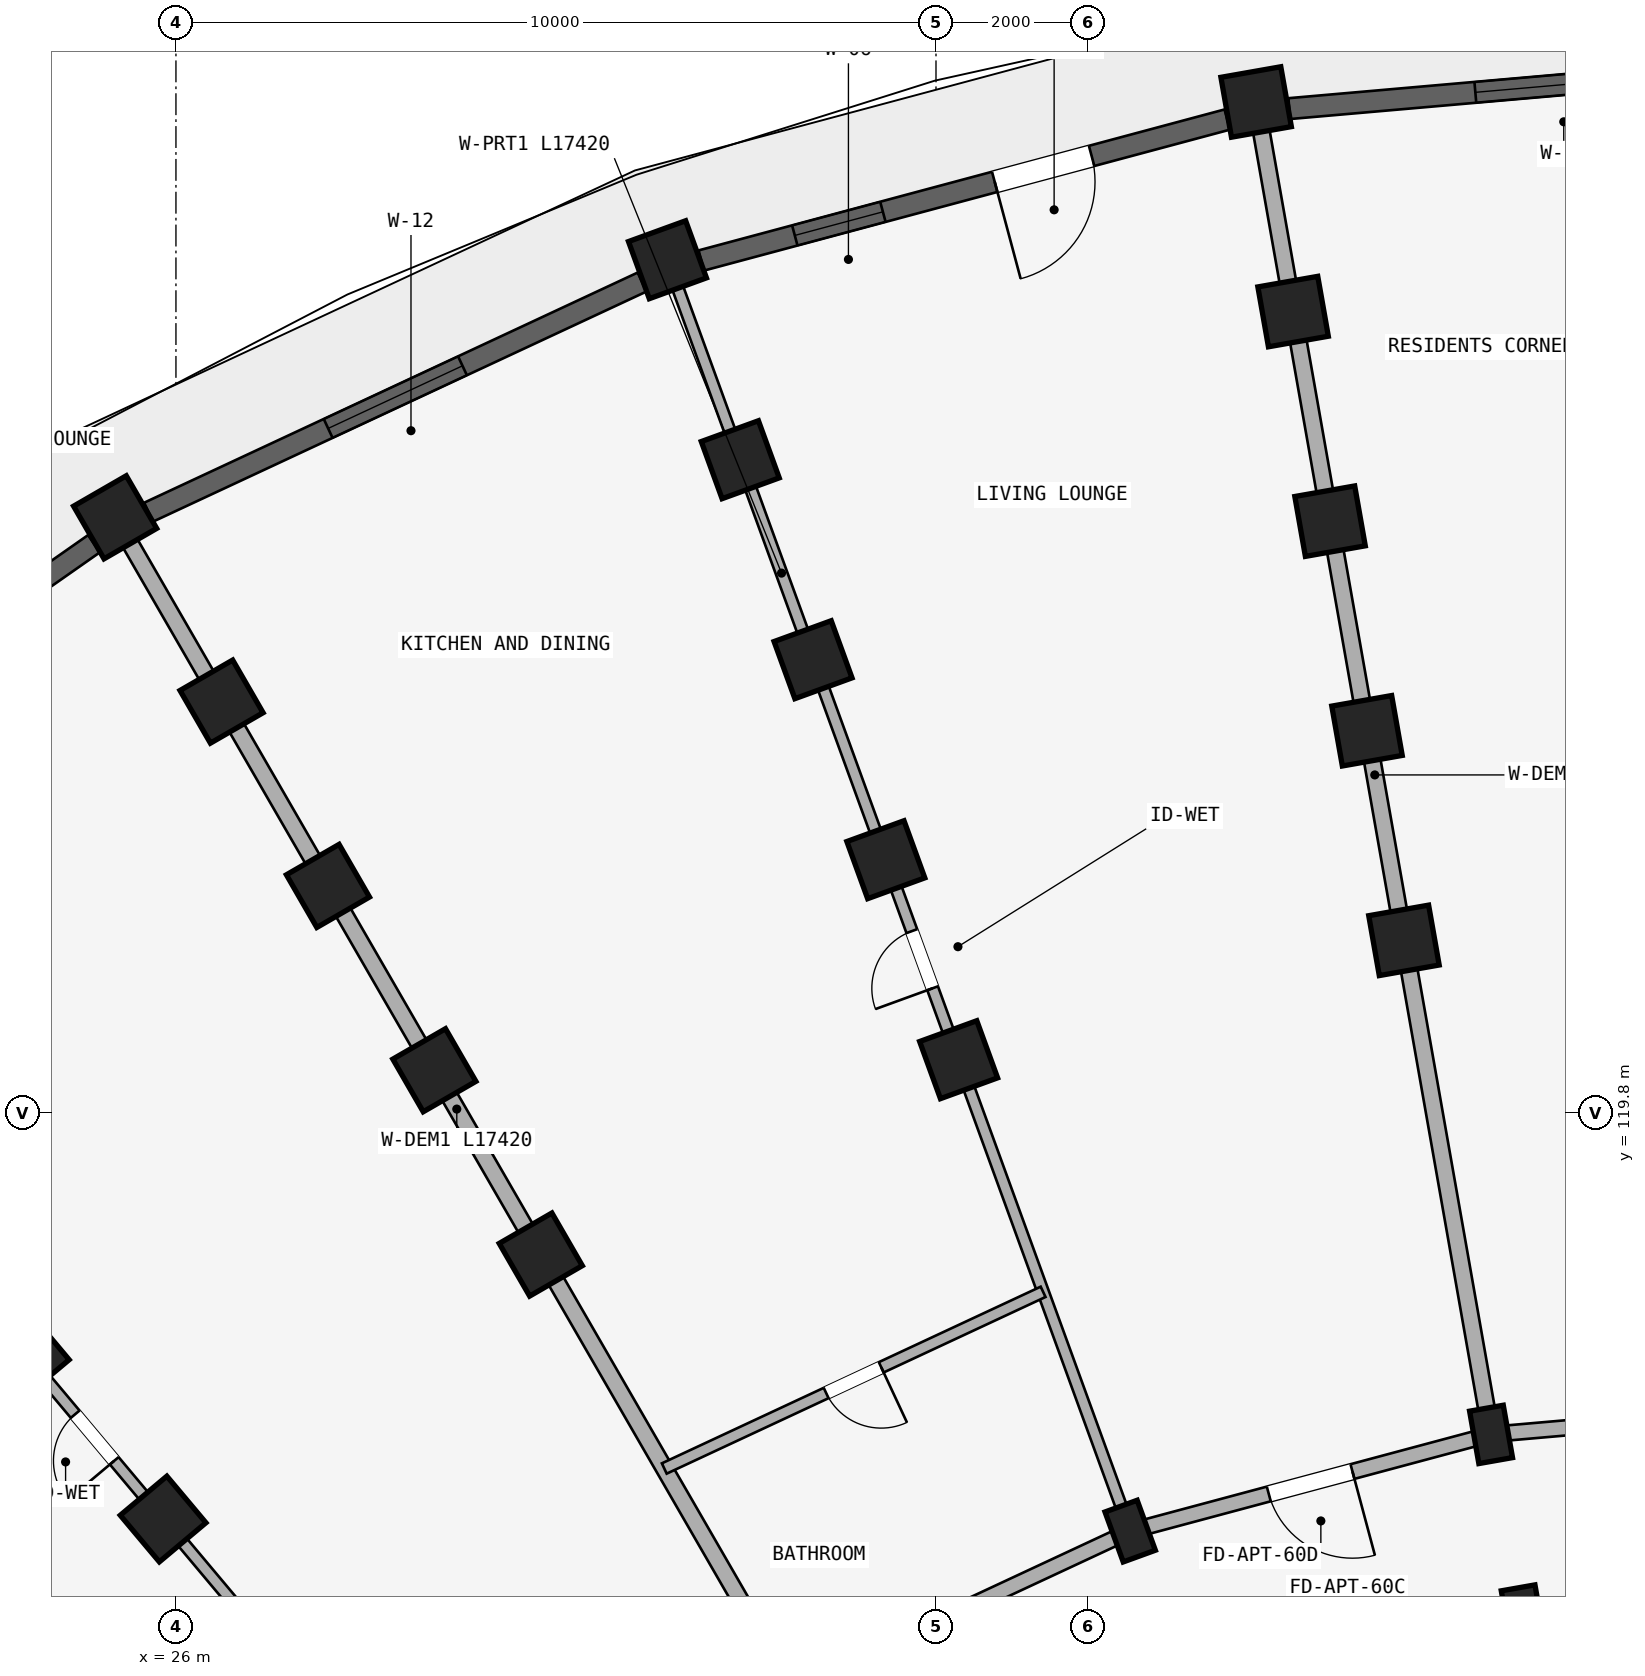
"""IFC4 building model, lengths in metres.
Left out: names, types, materials, properties, quantities, classifications, styles, units other than length and angle.
Written with IfcOpenShell. Run it as: python <this file> out.ifc"""

import sys

from ifc_helpers import new_model, si_unit, direction, frame, frame_2d, origin, origin_2d, place, context, subcontext, project, spatial, rectangle, extrude, element, fill, save


model = new_model("IFC4")
c1 = context("Model", 3, precision=1e-05, world=origin(), true_north=direction((0.0, 1.0)))
c2 = subcontext(c1, "Body", "Model", "MODEL_VIEW")
j1 = project(units=[si_unit("LENGTHUNIT", "METRE"), si_unit("PLANEANGLEUNIT", "RADIAN")], contexts=[c1])
p1 = place(None, origin())
s1 = spatial("IfcSite", under=j1, at=p1, CompositionType="ELEMENT")
p2 = place(p1, origin())
s2 = spatial("IfcBuilding", under=s1, at=p2, CompositionType="ELEMENT")
p3 = place(p2, frame((0.0, 0.0, 15.0)))
s3 = spatial("IfcBuildingStorey", under=s2, at=p3, CompositionType="ELEMENT", Elevation=15.0)
for number, where, z_axis, x_axis in (
    (1, (43.72, 113.208, 0.0), (0.0, 0.0, 1.0), (0.985, 0.174, 0.0)),
    (2, (43.303, 115.572, 0.0), (0.0, 0.0, 1.0), (0.985, 0.174, 0.0)),
):
    element("IfcColumn", number, at=place(p3, frame(where, z_axis=z_axis, x_axis=x_axis)), inside=s3, PredefinedType="COLUMN", context=c2, shape_type="SweptSolid", body=[
        extrude(rectangle(XDim=0.45, YDim=0.7, at=origin_2d()), origin(), (0.0, 0.0, 1.0), 2.93),
    ])
for number, where, z_axis, x_axis in (
    (3, (42.157, 122.071, 0.0), (0.0, 0.0, 1.0), (0.985, 0.174, 0.0)),
    (4, (41.671, 124.829, 0.0), (0.0, 0.0, 1.0), (0.985, 0.174, 0.0)),
    (5, (41.185, 127.586, 0.0), (0.0, 0.0, 1.0), (0.985, 0.174, 0.0)),
    (6, (40.698, 130.344, 0.0), (0.0, 0.0, 1.0), (0.985, 0.174, 0.0)),
    (7, (40.212, 133.101, 0.0), (0.0, 0.0, 1.0), (0.985, 0.174, 0.0)),
):
    element("IfcColumn", number, at=place(p3, frame(where, z_axis=z_axis, x_axis=x_axis)), inside=s3, PredefinedType="COLUMN", context=c2, shape_type="SweptSolid", body=[
        extrude(rectangle(XDim=0.8, YDim=0.8, at=origin_2d()), origin(), (0.0, 0.0, 1.0), 2.93),
    ])
p4 = place(p3, frame((38.555, 114.299, 0.0), z_axis=(0.0, 0.0, 1.0), x_axis=(0.939692620786, 0.342020143326, 0.0)))
e8 = element("IfcColumn", 8, at=p4, inside=s3, PredefinedType="COLUMN", context=c2, shape_type="SweptSolid", body=[
    extrude(rectangle(XDim=0.45, YDim=0.7, at=origin_2d()), origin(), (0.0, 0.0, 1.0), 2.93),
])
for number, where, z_axis, x_axis in (
    (9, (36.298, 120.501, 0.0), (0.0, 0.0, 1.0), (0.94, 0.342, 0.0)),
    (10, (35.34, 123.132, 0.0), (0.0, 0.0, 1.0), (0.94, 0.342, 0.0)),
    (11, (34.382, 125.764, 0.0), (0.0, 0.0, 1.0), (0.94, 0.342, 0.0)),
    (12, (33.425, 128.395, 0.0), (0.0, 0.0, 1.0), (0.94, 0.342, 0.0)),
    (13, (32.467, 131.026, 0.0), (0.0, 0.0, 1.0), (0.94, 0.342, 0.0)),
    (14, (30.8, 117.938, 0.0), (0.0, 0.0, 1.0), (0.866, 0.5, 0.0)),
    (15, (29.4, 120.363, 0.0), (0.0, 0.0, 1.0), (0.866, 0.5, 0.0)),
    (16, (28.0, 122.787, 0.0), (0.0, 0.0, 1.0), (0.866, 0.5, 0.0)),
    (17, (26.6, 125.212, 0.0), (0.0, 0.0, 1.0), (0.866, 0.5, 0.0)),
    (18, (25.2, 127.637, 0.0), (0.0, 0.0, 1.0), (0.866, 0.5, 0.0)),
    (19, (25.831, 114.458, 0.0), (0.0, 0.0, 1.0), (0.766, 0.643, 0.0)),
    (20, (24.031, 116.603, 0.0), (0.0, 0.0, 1.0), (0.766, 0.643, 0.0)),
):
    element("IfcColumn", number, at=place(p3, frame(where, z_axis=z_axis, x_axis=x_axis)), inside=s3, PredefinedType="COLUMN", context=c2, shape_type="SweptSolid", body=[
        extrude(rectangle(XDim=0.8, YDim=0.8, at=origin_2d()), origin(), (0.0, 0.0, 1.0), 2.93),
    ])
p5 = place(p3, frame((48.2, 113.6, 0.0), z_axis=(0.0, 0.0, 1.0), x_axis=(-0.996191949488, -0.087187153726, 0.0)))
e21 = element("IfcWall", 21, at=p5, inside=s3, PredefinedType="STANDARD", context=c2, shape_type="SweptSolid", body=[
    extrude(rectangle(XDim=4.497, YDim=0.2, at=frame_2d((2.249, 0.0))), origin(), (0.0, 0.0, 1.0), 2.372),
])
p6 = place(p5, frame((1.729, 0.0, 0.0)))
e22 = element("IfcOpeningElement", 22, at=p6, cuts=e21, PredefinedType="OPENING", context=c2, shape_type="SweptSolid", body=[
    extrude(rectangle(XDim=1.04, YDim=2.15, at=frame_2d((0.52, 1.075))), frame((0.0, 0.11, 0.0), z_axis=(0.0, -1.0, 0.0), x_axis=(1.0, 0.0, 0.0)), (0.0, 0.0, 1.0), 0.22),
])
p7 = place(p3, frame((48.2, 116.0, 0.0), z_axis=(0.0, 0.0, 1.0), x_axis=(-0.996193663584, -0.087167566415, 0.0)))
e23 = element("IfcWall", 23, at=p7, inside=s3, PredefinedType="STANDARD", context=c2, shape_type="SweptSolid", body=[
    extrude(rectangle(XDim=4.916, YDim=0.2, at=frame_2d((2.458, 0.0))), origin(), (0.0, 0.0, 1.0), 2.372),
])
p8 = place(p7, frame((1.918, 0.0, 0.0)))
e24 = element("IfcOpeningElement", 24, at=p8, cuts=e23, PredefinedType="OPENING", context=c2, shape_type="SweptSolid", body=[
    extrude(rectangle(XDim=1.08, YDim=2.15, at=frame_2d((0.54, 1.075))), frame((0.0, 0.11, 0.0), z_axis=(0.0, -1.0, 0.0), x_axis=(1.0, 0.0, 0.0)), (0.0, 0.0, 1.0), 0.22),
])
p9 = place(p3, frame((43.303, 115.572, 0.0), z_axis=(0.0, 0.0, 1.0), x_axis=(-0.965930095386, -0.258803112091, 0.0)))
e25 = element("IfcWall", 25, at=p9, inside=s3, PredefinedType="STANDARD", context=c2, shape_type="SweptSolid", body=[
    extrude(rectangle(XDim=4.916, YDim=0.2, at=frame_2d((2.458, 0.0))), origin(), (0.0, 0.0, 1.0), 2.372),
])
p10 = place(p9, frame((1.888, 0.0, 0.0)))
e26 = element("IfcOpeningElement", 26, at=p10, cuts=e25, PredefinedType="OPENING", context=c2, shape_type="SweptSolid", body=[
    extrude(rectangle(XDim=1.14, YDim=2.15, at=frame_2d((0.57, 1.075))), frame((0.0, 0.11, 0.0), z_axis=(0.0, -1.0, 0.0), x_axis=(1.0, 0.0, 0.0)), (0.0, 0.0, 1.0), 0.22),
])
p11 = place(p3, frame((38.555, 114.299, 0.0), z_axis=(0.0, 0.0, 1.0), x_axis=(-0.906302381024, -0.422629854778, 0.0)))
e27 = element("IfcWall", 27, at=p11, inside=s3, PredefinedType="STANDARD", context=c2, shape_type="SweptSolid", body=[
    extrude(rectangle(XDim=4.915, YDim=0.2, at=frame_2d((2.458, 0.0))), origin(), (0.0, 0.0, 1.0), 2.372),
])
p12 = place(p3, frame((43.286, 115.67, 0.0), z_axis=(0.0, 0.0, 1.0), x_axis=(-0.173646216546, 0.984808098809, 0.0)))
e28 = element("IfcWall", 28, at=p12, inside=s3, PredefinedType="STANDARD", context=c2, shape_type="SweptSolid", body=[
    extrude(rectangle(XDim=17.42, YDim=0.22, at=frame_2d((8.71, 0.0))), origin(), (0.0, 0.0, 1.0), 2.372),
])
p13 = place(p3, frame((38.521, 114.393, 0.0), z_axis=(0.0, 0.0, 1.0), x_axis=(-0.342022120477, 0.939691901159, 0.0)))
e29 = element("IfcWall", 29, at=p13, inside=s3, PredefinedType="PARTITIONING", context=c2, shape_type="SweptSolid", body=[
    extrude(rectangle(XDim=17.42, YDim=0.15, at=frame_2d((8.71, 0.0))), origin(), (0.0, 0.0, 1.0), 2.372),
])
p14 = place(p13, frame((7.5, 0.0, 0.0)))
e30 = element("IfcOpeningElement", 30, at=p14, cuts=e29, PredefinedType="OPENING", context=c2, shape_type="SweptSolid", body=[
    extrude(rectangle(XDim=0.8, YDim=2.1, at=frame_2d((0.4, 1.05))), frame((0.0, 0.085, 0.0), z_axis=(0.0, -1.0, 0.0), x_axis=(1.0, 0.0, 0.0)), (0.0, 0.0, 1.0), 0.17),
])
p15 = place(p3, frame((34.05, 112.309, 0.0), z_axis=(0.0, 0.0, 1.0), x_axis=(-0.499997843263, 0.866026648973, 0.0)))
e31 = element("IfcWall", 31, at=p15, inside=s3, PredefinedType="STANDARD", context=c2, shape_type="SweptSolid", body=[
    extrude(rectangle(XDim=17.42, YDim=0.22, at=frame_2d((8.71, 0.0))), origin(), (0.0, 0.0, 1.0), 2.372),
])
p16 = place(p3, frame((30.009, 109.479, 0.0), z_axis=(0.0, 0.0, 1.0), x_axis=(-0.642784757967, 0.766046835987, 0.0)))
e32 = element("IfcWall", 32, at=p16, inside=s3, PredefinedType="PARTITIONING", context=c2, shape_type="SweptSolid", body=[
    extrude(rectangle(XDim=17.42, YDim=0.15, at=frame_2d((8.71, 0.0))), origin(), (0.0, 0.0, 1.0), 2.372),
])
p17 = place(p16, frame((7.5, 0.0, 0.0)))
e33 = element("IfcOpeningElement", 33, at=p17, cuts=e32, PredefinedType="OPENING", context=c2, shape_type="SweptSolid", body=[
    extrude(rectangle(XDim=0.8, YDim=2.1, at=frame_2d((0.4, 1.05))), frame((0.0, 0.085, 0.0), z_axis=(0.0, -1.0, 0.0), x_axis=(1.0, 0.0, 0.0)), (0.0, 0.0, 1.0), 0.17),
])
p18 = place(p3, frame((26.521, 105.991, 0.0), z_axis=(0.0, 0.0, 1.0), x_axis=(-0.766046835987, 0.642784757967, 0.0)))
e34 = element("IfcWall", 34, at=p18, inside=s3, PredefinedType="STANDARD", context=c2, shape_type="SweptSolid", body=[
    extrude(rectangle(XDim=17.42, YDim=0.22, at=frame_2d((8.71, 0.0))), origin(), (0.0, 0.0, 1.0), 2.372),
])
p19 = place(p3, frame((37.409, 117.447, 0.0), z_axis=(0.0, 0.0, 1.0), x_axis=(-0.906302189986, -0.422630264446, 0.0)))
e35 = element("IfcWall", 35, at=p19, inside=s3, PredefinedType="PLUMBINGWALL", context=c2, shape_type="SweptSolid", body=[
    extrude(rectangle(XDim=5.5, YDim=0.15, at=frame_2d((2.75, 0.0))), origin(), (0.0, 0.0, 1.0), 2.372),
])
p20 = place(p19, frame((2.35, 0.0, 0.0)))
e36 = element("IfcOpeningElement", 36, at=p20, cuts=e35, PredefinedType="OPENING", context=c2, shape_type="SweptSolid", body=[
    extrude(rectangle(XDim=0.8, YDim=2.1, at=frame_2d((0.4, 1.05))), frame((0.0, 0.085, 0.0), z_axis=(0.0, -1.0, 0.0), x_axis=(1.0, 0.0, 0.0)), (0.0, 0.0, 1.0), 0.17),
])
p21 = place(p3, frame((47.785, 133.638, 0.0), z_axis=(0.0, 0.0, 1.0), x_axis=(-0.99619608453, -0.08713989423, 0.0)))
e37 = element("IfcWall", 37, at=p21, inside=s3, PredefinedType="STANDARD", context=c2, shape_type="SweptSolid", body=[
    extrude(rectangle(XDim=7.164, YDim=0.275, at=frame_2d((3.582, 0.0))), origin(), (0.0, 0.0, 1.0), 2.472),
])
p22 = place(p21, frame((2.457, 0.0, 0.322)))
e38 = element("IfcOpeningElement", 38, at=p22, cuts=e37, PredefinedType="OPENING", context=c2, shape_type="SweptSolid", body=[
    extrude(rectangle(XDim=2.25, YDim=1.95, at=frame_2d((1.125, 0.975))), frame((0.0, 0.147, 0.0), z_axis=(0.0, -1.0, 0.0), x_axis=(1.0, 0.0, 0.0)), (0.0, 0.0, 1.0), 0.295),
])
p23 = place(p3, frame((39.832, 132.87, 0.0), z_axis=(0.0, 0.0, 1.0), x_axis=(-0.965923712619, -0.258826933296, 0.0)))
e39 = element("IfcWall", 39, at=p23, inside=s3, PredefinedType="STANDARD", context=c2, shape_type="SweptSolid", body=[
    extrude(rectangle(XDim=7.164, YDim=0.275, at=frame_2d((3.582, 0.0))), origin(), (0.0, 0.0, 1.0), 2.472),
])
p24 = place(p23, frame((4.69, 0.0, 0.472)))
e40 = element("IfcOpeningElement", 40, at=p24, cuts=e39, PredefinedType="OPENING", context=c2, shape_type="SweptSolid", body=[
    extrude(rectangle(XDim=1.2, YDim=1.5, at=frame_2d((0.6, 0.75))), frame((0.0, 0.147, 0.0), z_axis=(0.0, -1.0, 0.0), x_axis=(1.0, 0.0, 0.0)), (0.0, 0.0, 1.0), 0.295),
])
p25 = place(p23, frame((1.847, 0.0, 0.0)))
e41 = element("IfcOpeningElement", 41, at=p25, cuts=e39, PredefinedType="OPENING", context=c2, shape_type="SweptSolid", body=[
    extrude(rectangle(XDim=1.32, YDim=2.15, at=frame_2d((0.66, 1.075))), frame((0.0, 0.147, 0.0), z_axis=(0.0, -1.0, 0.0), x_axis=(1.0, 0.0, 0.0)), (0.0, 0.0, 1.0), 0.295),
])
p26 = place(p3, frame((32.133, 130.732, 0.0), z_axis=(0.0, 0.0, 1.0), x_axis=(-0.906300636296, -0.422633596215, 0.0)))
e42 = element("IfcWall", 42, at=p26, inside=s3, PredefinedType="STANDARD", context=c2, shape_type="SweptSolid", body=[
    extrude(rectangle(XDim=7.164, YDim=0.275, at=frame_2d((3.582, 0.0))), origin(), (0.0, 0.0, 1.0), 2.472),
])
p27 = place(p26, frame((2.607, 0.0, 0.422)))
e43 = element("IfcOpeningElement", 43, at=p27, cuts=e42, PredefinedType="OPENING", context=c2, shape_type="SweptSolid", body=[
    extrude(rectangle(XDim=1.95, YDim=1.85, at=frame_2d((0.975, 0.925))), frame((0.0, 0.147, 0.0), z_axis=(0.0, -1.0, 0.0), x_axis=(1.0, 0.0, 0.0)), (0.0, 0.0, 1.0), 0.295),
])
p28 = place(p3, frame((24.922, 127.29, 0.0), z_axis=(0.0, 0.0, 1.0), x_axis=(-0.819161471697, -0.573562972382, 0.0)))
e44 = element("IfcWall", 44, at=p28, inside=s3, PredefinedType="STANDARD", context=c2, shape_type="SweptSolid", body=[
    extrude(rectangle(XDim=7.164, YDim=0.275, at=frame_2d((3.582, 0.0))), origin(), (0.0, 0.0, 1.0), 2.472),
])
p29 = place(p28, frame((2.682, 0.0, 0.622)))
e45 = element("IfcOpeningElement", 45, at=p29, cuts=e44, PredefinedType="OPENING", context=c2, shape_type="SweptSolid", body=[
    extrude(rectangle(XDim=1.8, YDim=1.65, at=frame_2d((0.9, 0.825))), frame((0.0, 0.147, 0.0), z_axis=(0.0, -1.0, 0.0), x_axis=(1.0, 0.0, 0.0)), (0.0, 0.0, 1.0), 0.295),
])
p30 = place(p22, origin())
e46 = element("IfcWindow", 46, at=p30, inside=s3, PartitioningType="TRIPLE_PANEL_VERTICAL", PredefinedType="WINDOW", context=c2, shape_type="SweptSolid", body=[
    extrude(rectangle(XDim=2.25, YDim=1.95, at=frame_2d((1.125, 0.975))), frame((0.0, 0.03, 0.0), z_axis=(0.0, -1.0, 0.0), x_axis=(1.0, 0.0, 0.0)), (0.0, 0.0, 1.0), 0.06),
])
fill(e38, e46)
p31 = place(p24, origin())
e47 = element("IfcWindow", 47, at=p31, inside=s3, PartitioningType="SINGLE_PANEL", PredefinedType="WINDOW", context=c2, shape_type="SweptSolid", body=[
    extrude(rectangle(XDim=1.2, YDim=1.5, at=frame_2d((0.6, 0.75))), frame((0.0, 0.03, 0.0), z_axis=(0.0, -1.0, 0.0), x_axis=(1.0, 0.0, 0.0)), (0.0, 0.0, 1.0), 0.06),
])
fill(e40, e47)
p32 = place(p27, origin())
e48 = element("IfcWindow", 48, at=p32, inside=s3, PartitioningType="DOUBLE_PANEL_VERTICAL", PredefinedType="WINDOW", context=c2, shape_type="SweptSolid", body=[
    extrude(rectangle(XDim=1.95, YDim=1.85, at=frame_2d((0.975, 0.925))), frame((0.0, 0.03, 0.0), z_axis=(0.0, -1.0, 0.0), x_axis=(1.0, 0.0, 0.0)), (0.0, 0.0, 1.0), 0.06),
])
fill(e43, e48)
p33 = place(p14, origin())
e49 = element("IfcDoor", 49, at=p33, inside=s3, OperationType="SINGLE_SWING_LEFT", PredefinedType="DOOR", context=c2, shape_type="SweptSolid", body=[
    extrude(rectangle(XDim=0.8, YDim=2.1, at=frame_2d((0.4, 1.05))), frame((0.0, 0.025, 0.0), z_axis=(0.0, -1.0, 0.0), x_axis=(1.0, 0.0, 0.0)), (0.0, 0.0, 1.0), 0.05),
])
fill(e30, e49)
p34 = place(p17, frame((0.8, 0.0, 0.0), z_axis=(0.0, 0.0, 1.0), x_axis=(-1.0, 0.0, 0.0)))
e50 = element("IfcDoor", 50, at=p34, inside=s3, OperationType="SINGLE_SWING_RIGHT", PredefinedType="DOOR", context=c2, shape_type="SweptSolid", body=[
    extrude(rectangle(XDim=0.8, YDim=2.1, at=frame_2d((0.4, 1.05))), frame((0.0, 0.025, 0.0), z_axis=(0.0, -1.0, 0.0), x_axis=(1.0, 0.0, 0.0)), (0.0, 0.0, 1.0), 0.05),
])
fill(e33, e50)
p35 = place(p10, frame((1.14, 0.0, 0.0), z_axis=(0.0, 0.0, 1.0), x_axis=(-1.0, 0.0, 0.0)))
e51 = element("IfcDoor", 51, at=p35, inside=s3, OperationType="SINGLE_SWING_RIGHT", PredefinedType="DOOR", context=c2, shape_type="SweptSolid", body=[
    extrude(rectangle(XDim=1.14, YDim=2.15, at=frame_2d((0.57, 1.075))), frame((0.0, 0.025, 0.0), z_axis=(0.0, -1.0, 0.0), x_axis=(1.0, 0.0, 0.0)), (0.0, 0.0, 1.0), 0.05),
])
fill(e26, e51)
p36 = place(p20, origin())
e52 = element("IfcDoor", 52, at=p36, inside=s3, OperationType="SINGLE_SWING_LEFT", PredefinedType="DOOR", context=c2, shape_type="SweptSolid", body=[
    extrude(rectangle(XDim=0.8, YDim=2.1, at=frame_2d((0.4, 1.05))), frame((0.0, 0.025, 0.0), z_axis=(0.0, -1.0, 0.0), x_axis=(1.0, 0.0, 0.0)), (0.0, 0.0, 1.0), 0.05),
])
fill(e36, e52)
p37 = place(p25, frame((1.32, 0.0, 0.0), z_axis=(0.0, 0.0, 1.0), x_axis=(-1.0, 0.0, 0.0)))
e53 = element("IfcDoor", 53, at=p37, inside=s3, OperationType="SINGLE_SWING_LEFT", PredefinedType="DOOR", context=c2, shape_type="SweptSolid", body=[
    extrude(rectangle(XDim=1.32, YDim=2.15, at=frame_2d((0.66, 1.075))), frame((0.0, 0.025, 0.0), z_axis=(0.0, -1.0, 0.0), x_axis=(1.0, 0.0, 0.0)), (0.0, 0.0, 1.0), 0.05),
])
fill(e41, e53)
save(model, sys.argv[1])
